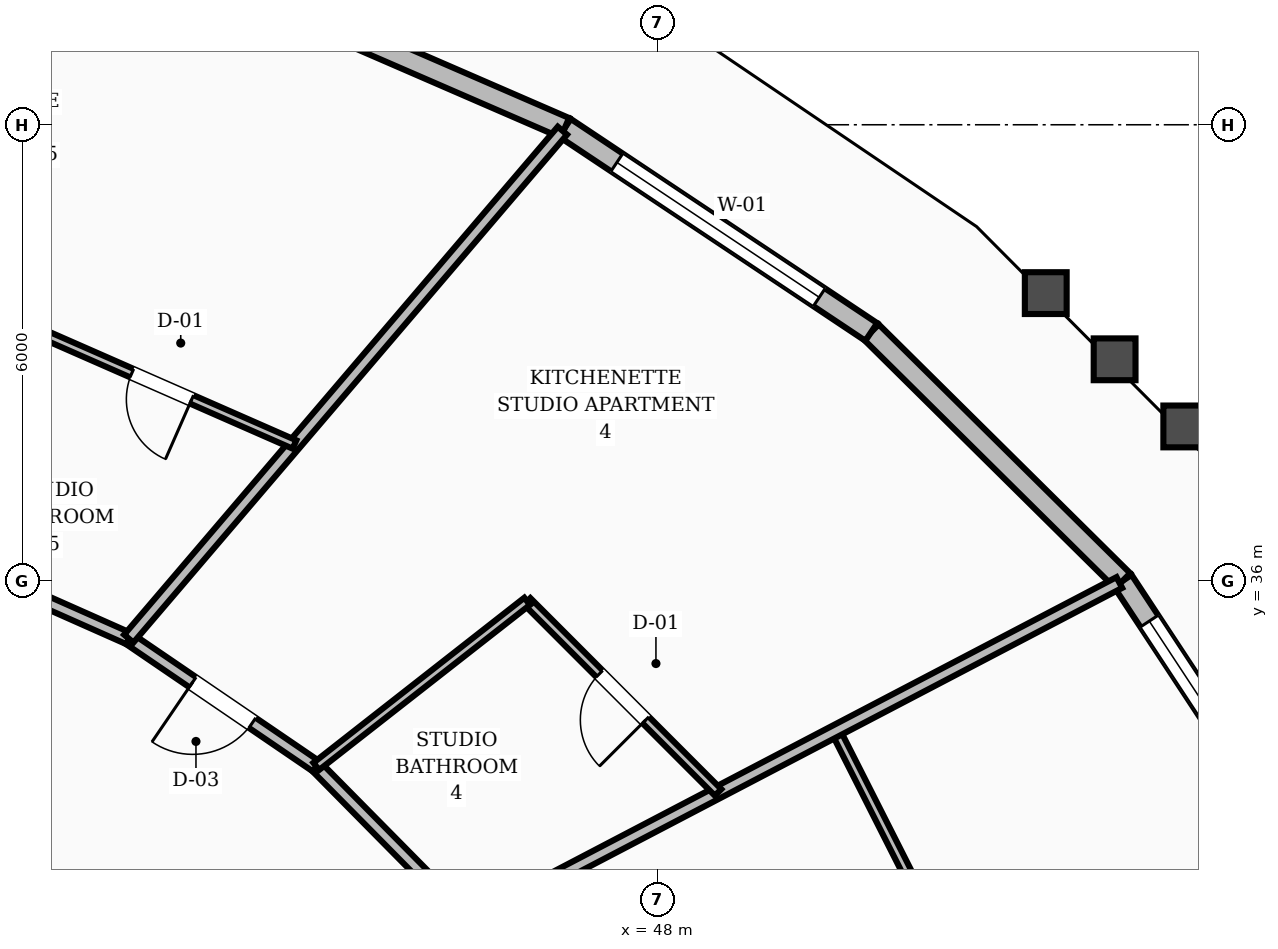
"""IFC4 building model, lengths in metres.
Left out: names, types, materials, properties, quantities, classifications, styles, units other than length and angle.
Written with IfcOpenShell. Run it as: python <this file> out.ifc"""

import sys

from ifc_helpers import new_model, si_unit, direction, frame, frame_2d, origin, place, context, subcontext, project, spatial, rectangle, extrude, element, fill, save


model = new_model("IFC4")
c1 = context("Model", 3, precision=1e-05, world=origin(), true_north=direction((0.0, 1.0)))
c2 = subcontext(c1, "Body", "Model", "MODEL_VIEW")
j1 = project(units=[si_unit("LENGTHUNIT", "METRE"), si_unit("PLANEANGLEUNIT", "RADIAN")], contexts=[c1])
p1 = place(None, origin())
s1 = spatial("IfcSite", under=j1, at=p1, CompositionType="ELEMENT")
p2 = place(p1, origin())
s2 = spatial("IfcBuilding", under=s1, at=p2, CompositionType="ELEMENT")
p3 = place(p2, frame((0.0, 0.0, 55.6)))
s3 = spatial("IfcBuildingStorey", under=s2, at=p3, CompositionType="ELEMENT", Elevation=55.6)
p4 = place(p3, frame((56.576, 32.266, 0.0), z_axis=(0.0, 0.0, 1.0), x_axis=(-0.549775955505, 0.835312156471, 0.0)))
e1 = element("IfcWall", 1, at=p4, inside=s3, PredefinedType="STANDARD", context=c2, shape_type="SweptSolid", body=[
    extrude(rectangle(XDim=4.471, YDim=0.28, at=frame_2d((2.235, 0.0))), origin(), (0.0, 0.0, 1.0), 2.65),
])
p5 = place(p4, frame((0.635, 0.0, 0.8)))
e2 = element("IfcOpeningElement", 2, at=p5, cuts=e1, PredefinedType="OPENING", context=c2, shape_type="SweptSolid", body=[
    extrude(rectangle(XDim=3.2, YDim=1.65, at=frame_2d((1.6, 0.825))), frame((0.0, 0.15, 0.0), z_axis=(0.0, -1.0, 0.0), x_axis=(1.0, 0.0, 0.0)), (0.0, 0.0, 1.0), 0.3),
])
p6 = place(p3, frame((54.118, 36.001, 0.0), z_axis=(0.0, 0.0, 1.0), x_axis=(-0.710847800391, 0.703345864195, 0.0)))
e3 = element("IfcWall", 3, at=p6, inside=s3, PredefinedType="STANDARD", context=c2, shape_type="SweptSolid", body=[
    extrude(rectangle(XDim=4.654, YDim=0.28, at=frame_2d((2.327, 0.0))), origin(), (0.0, 0.0, 1.0), 2.65),
])
p7 = place(p3, frame((50.81, 39.274, 0.0), z_axis=(0.0, 0.0, 1.0), x_axis=(-0.832151080198, 0.55454898767, 0.0)))
e4 = element("IfcWall", 4, at=p7, inside=s3, PredefinedType="STANDARD", context=c2, shape_type="SweptSolid", body=[
    extrude(rectangle(XDim=4.844, YDim=0.28, at=frame_2d((2.422, 0.0))), origin(), (0.0, 0.0, 1.0), 2.65),
])
p8 = place(p7, frame((0.822, 0.0, 0.8)))
e5 = element("IfcOpeningElement", 5, at=p8, cuts=e4, PredefinedType="OPENING", context=c2, shape_type="SweptSolid", body=[
    extrude(rectangle(XDim=3.2, YDim=1.65, at=frame_2d((1.6, 0.825))), frame((0.0, 0.15, 0.0), z_axis=(0.0, -1.0, 0.0), x_axis=(1.0, 0.0, 0.0)), (0.0, 0.0, 1.0), 0.3),
])
p9 = place(p3, frame((46.779, 41.96, 0.0), z_axis=(0.0, 0.0, 1.0), x_axis=(-0.917319172231, 0.398152654465, 0.0)))
e6 = element("IfcWall", 6, at=p9, inside=s3, PredefinedType="STANDARD", context=c2, shape_type="SweptSolid", body=[
    extrude(rectangle(XDim=5.013, YDim=0.28, at=frame_2d((2.507, 0.0))), origin(), (0.0, 0.0, 1.0), 2.65),
])
p10 = place(p3, frame((45.531, 31.51, 0.0), z_axis=(0.0, 0.0, 1.0), x_axis=(-0.702811997, 0.711375636969, 0.0)))
e7 = element("IfcWall", 7, at=p10, inside=s3, PredefinedType="SOLIDWALL", context=c2, shape_type="SweptSolid", body=[
    extrude(rectangle(XDim=2.879, YDim=0.16, at=frame_2d((1.44, 0.0))), origin(), (0.0, 0.0, 1.0), 2.61),
])
p11 = place(p3, frame((43.508, 33.559, 0.0), z_axis=(0.0, 0.0, 1.0), x_axis=(-0.826293096206, 0.56324037423, 0.0)))
e8 = element("IfcWall", 8, at=p11, inside=s3, PredefinedType="SOLIDWALL", context=c2, shape_type="SweptSolid", body=[
    extrude(rectangle(XDim=2.985, YDim=0.16, at=frame_2d((1.492, 0.0))), origin(), (0.0, 0.0, 1.0), 2.61),
])
p12 = place(p11, frame((1.017, 0.0, 0.0)))
e9 = element("IfcOpeningElement", 9, at=p12, cuts=e8, PredefinedType="OPENING", context=c2, shape_type="SweptSolid", body=[
    extrude(rectangle(XDim=0.95, YDim=2.1, at=frame_2d((0.475, 1.05))), frame((0.0, 0.09, 0.0), z_axis=(0.0, -1.0, 0.0), x_axis=(1.0, 0.0, 0.0)), (0.0, 0.0, 1.0), 0.18),
])
p13 = place(p3, frame((41.041, 35.24, 0.0), z_axis=(0.0, 0.0, 1.0), x_axis=(-0.913952123493, 0.405822024984, 0.0)))
e10 = element("IfcWall", 10, at=p13, inside=s3, PredefinedType="SOLIDWALL", context=c2, shape_type="SweptSolid", body=[
    extrude(rectangle(XDim=3.078, YDim=0.16, at=frame_2d((1.539, 0.0))), origin(), (0.0, 0.0, 1.0), 2.61),
])
p14 = place(p3, frame((53.633, 27.52, 0.0), z_axis=(0.0, 0.0, 1.0), x_axis=(-0.451721769602, 0.892158866384, 0.0)))
e11 = element("IfcWall", 11, at=p14, inside=s3, PredefinedType="PARTITIONING", context=c2, shape_type="SweptSolid", body=[
    extrude(rectangle(XDim=7.291, YDim=0.12, at=frame_2d((3.646, 0.0))), origin(), (0.0, 0.0, 1.0), 2.61),
])
p15 = place(p14, frame((3.17, 0.0, 0.0)))
e12 = element("IfcOpeningElement", 12, at=p15, cuts=e11, PredefinedType="OPENING", context=c2, shape_type="SweptSolid", body=[
    extrude(rectangle(XDim=0.95, YDim=2.1, at=frame_2d((0.475, 1.05))), frame((0.0, 0.07, 0.0), z_axis=(0.0, -1.0, 0.0), x_axis=(1.0, 0.0, 0.0)), (0.0, 0.0, 1.0), 0.14),
])
p16 = place(p3, frame((45.531, 31.51, 0.0), z_axis=(0.0, 0.0, 1.0), x_axis=(0.886139175606, 0.463419207043, 0.0)))
e13 = element("IfcWall", 13, at=p16, inside=s3, PredefinedType="SOLIDWALL", context=c2, shape_type="SweptSolid", body=[
    extrude(rectangle(XDim=9.64, YDim=0.16, at=frame_2d((4.82, 0.0))), origin(), (0.0, 0.0, 1.0), 2.61),
])
p17 = place(p3, frame((48.794, 33.217, 0.0), z_axis=(0.0, 0.0, 1.0), x_axis=(-0.706831936487, 0.707381519099, 0.0)))
e14 = element("IfcWall", 14, at=p17, inside=s3, PredefinedType="PARTITIONING", context=c2, shape_type="SweptSolid", body=[
    extrude(rectangle(XDim=3.554, YDim=0.12, at=frame_2d((1.777, 0.0))), origin(), (0.0, 0.0, 1.0), 2.61),
])
p18 = place(p17, frame((1.347, 0.0, 0.0)))
e15 = element("IfcOpeningElement", 15, at=p18, cuts=e14, PredefinedType="OPENING", context=c2, shape_type="SweptSolid", body=[
    extrude(rectangle(XDim=0.86, YDim=2.1, at=frame_2d((0.43, 1.05))), frame((0.0, 0.07, 0.0), z_axis=(0.0, -1.0, 0.0), x_axis=(1.0, 0.0, 0.0)), (0.0, 0.0, 1.0), 0.14),
])
p19 = place(p3, frame((43.508, 33.559, 0.0), z_axis=(0.0, 0.0, 1.0), x_axis=(0.787449438054, 0.616379252172, 0.0)))
e16 = element("IfcWall", 16, at=p19, inside=s3, PredefinedType="PARTITIONING", context=c2, shape_type="SweptSolid", body=[
    extrude(rectangle(XDim=3.524, YDim=0.12, at=frame_2d((1.762, 0.0))), origin(), (0.0, 0.0, 1.0), 2.61),
])
p20 = place(p3, frame((41.041, 35.24, 0.0), z_axis=(0.0, 0.0, 1.0), x_axis=(0.649272964512, 0.760555466454, 0.0)))
e17 = element("IfcWall", 17, at=p20, inside=s3, PredefinedType="SOLIDWALL", context=c2, shape_type="SweptSolid", body=[
    extrude(rectangle(XDim=8.786, YDim=0.16, at=frame_2d((4.393, 0.0))), origin(), (0.0, 0.0, 1.0), 2.61),
])
p21 = place(p3, frame((43.221, 37.794, 0.0), z_axis=(0.0, 0.0, 1.0), x_axis=(-0.915652650889, 0.40197042543, 0.0)))
e18 = element("IfcWall", 18, at=p21, inside=s3, PredefinedType="PARTITIONING", context=c2, shape_type="SweptSolid", body=[
    extrude(rectangle(XDim=3.814, YDim=0.12, at=frame_2d((1.907, 0.0))), origin(), (0.0, 0.0, 1.0), 2.61),
])
p22 = place(p21, frame((1.477, 0.0, 0.0)))
e19 = element("IfcOpeningElement", 19, at=p22, cuts=e18, PredefinedType="OPENING", context=c2, shape_type="SweptSolid", body=[
    extrude(rectangle(XDim=0.86, YDim=2.1, at=frame_2d((0.43, 1.05))), frame((0.0, 0.07, 0.0), z_axis=(0.0, -1.0, 0.0), x_axis=(1.0, 0.0, 0.0)), (0.0, 0.0, 1.0), 0.14),
])
p23 = place(p5, origin())
e20 = element("IfcWindow", 20, at=p23, inside=s3, PartitioningType="SINGLE_PANEL", PredefinedType="WINDOW", context=c2, shape_type="SweptSolid", body=[
    extrude(rectangle(XDim=3.2, YDim=1.65, at=frame_2d((1.6, 0.825))), frame((0.0, 0.03, 0.0), z_axis=(0.0, -1.0, 0.0), x_axis=(1.0, 0.0, 0.0)), (0.0, 0.0, 1.0), 0.06),
])
fill(e2, e20)
p24 = place(p8, origin())
e21 = element("IfcWindow", 21, at=p24, inside=s3, PartitioningType="SINGLE_PANEL", PredefinedType="WINDOW", context=c2, shape_type="SweptSolid", body=[
    extrude(rectangle(XDim=3.2, YDim=1.65, at=frame_2d((1.6, 0.825))), frame((0.0, 0.03, 0.0), z_axis=(0.0, -1.0, 0.0), x_axis=(1.0, 0.0, 0.0)), (0.0, 0.0, 1.0), 0.06),
])
fill(e5, e21)
p25 = place(p18, origin())
e22 = element("IfcDoor", 22, at=p25, inside=s3, OperationType="SINGLE_SWING_LEFT", PredefinedType="DOOR", context=c2, shape_type="SweptSolid", body=[
    extrude(rectangle(XDim=0.86, YDim=2.1, at=frame_2d((0.43, 1.05))), frame((0.0, 0.025, 0.0), z_axis=(0.0, -1.0, 0.0), x_axis=(1.0, 0.0, 0.0)), (0.0, 0.0, 1.0), 0.05),
])
fill(e15, e22)
p26 = place(p12, origin())
e23 = element("IfcDoor", 23, at=p26, inside=s3, OperationType="SINGLE_SWING_RIGHT", PredefinedType="DOOR", context=c2, shape_type="SweptSolid", body=[
    extrude(rectangle(XDim=0.95, YDim=2.1, at=frame_2d((0.475, 1.05))), frame((0.0, 0.025, 0.0), z_axis=(0.0, -1.0, 0.0), x_axis=(1.0, 0.0, 0.0)), (0.0, 0.0, 1.0), 0.05),
])
fill(e9, e23)
p27 = place(p22, origin())
e24 = element("IfcDoor", 24, at=p27, inside=s3, OperationType="SINGLE_SWING_LEFT", PredefinedType="DOOR", context=c2, shape_type="SweptSolid", body=[
    extrude(rectangle(XDim=0.86, YDim=2.1, at=frame_2d((0.43, 1.05))), frame((0.0, 0.025, 0.0), z_axis=(0.0, -1.0, 0.0), x_axis=(1.0, 0.0, 0.0)), (0.0, 0.0, 1.0), 0.05),
])
fill(e19, e24)
save(model, sys.argv[1])
